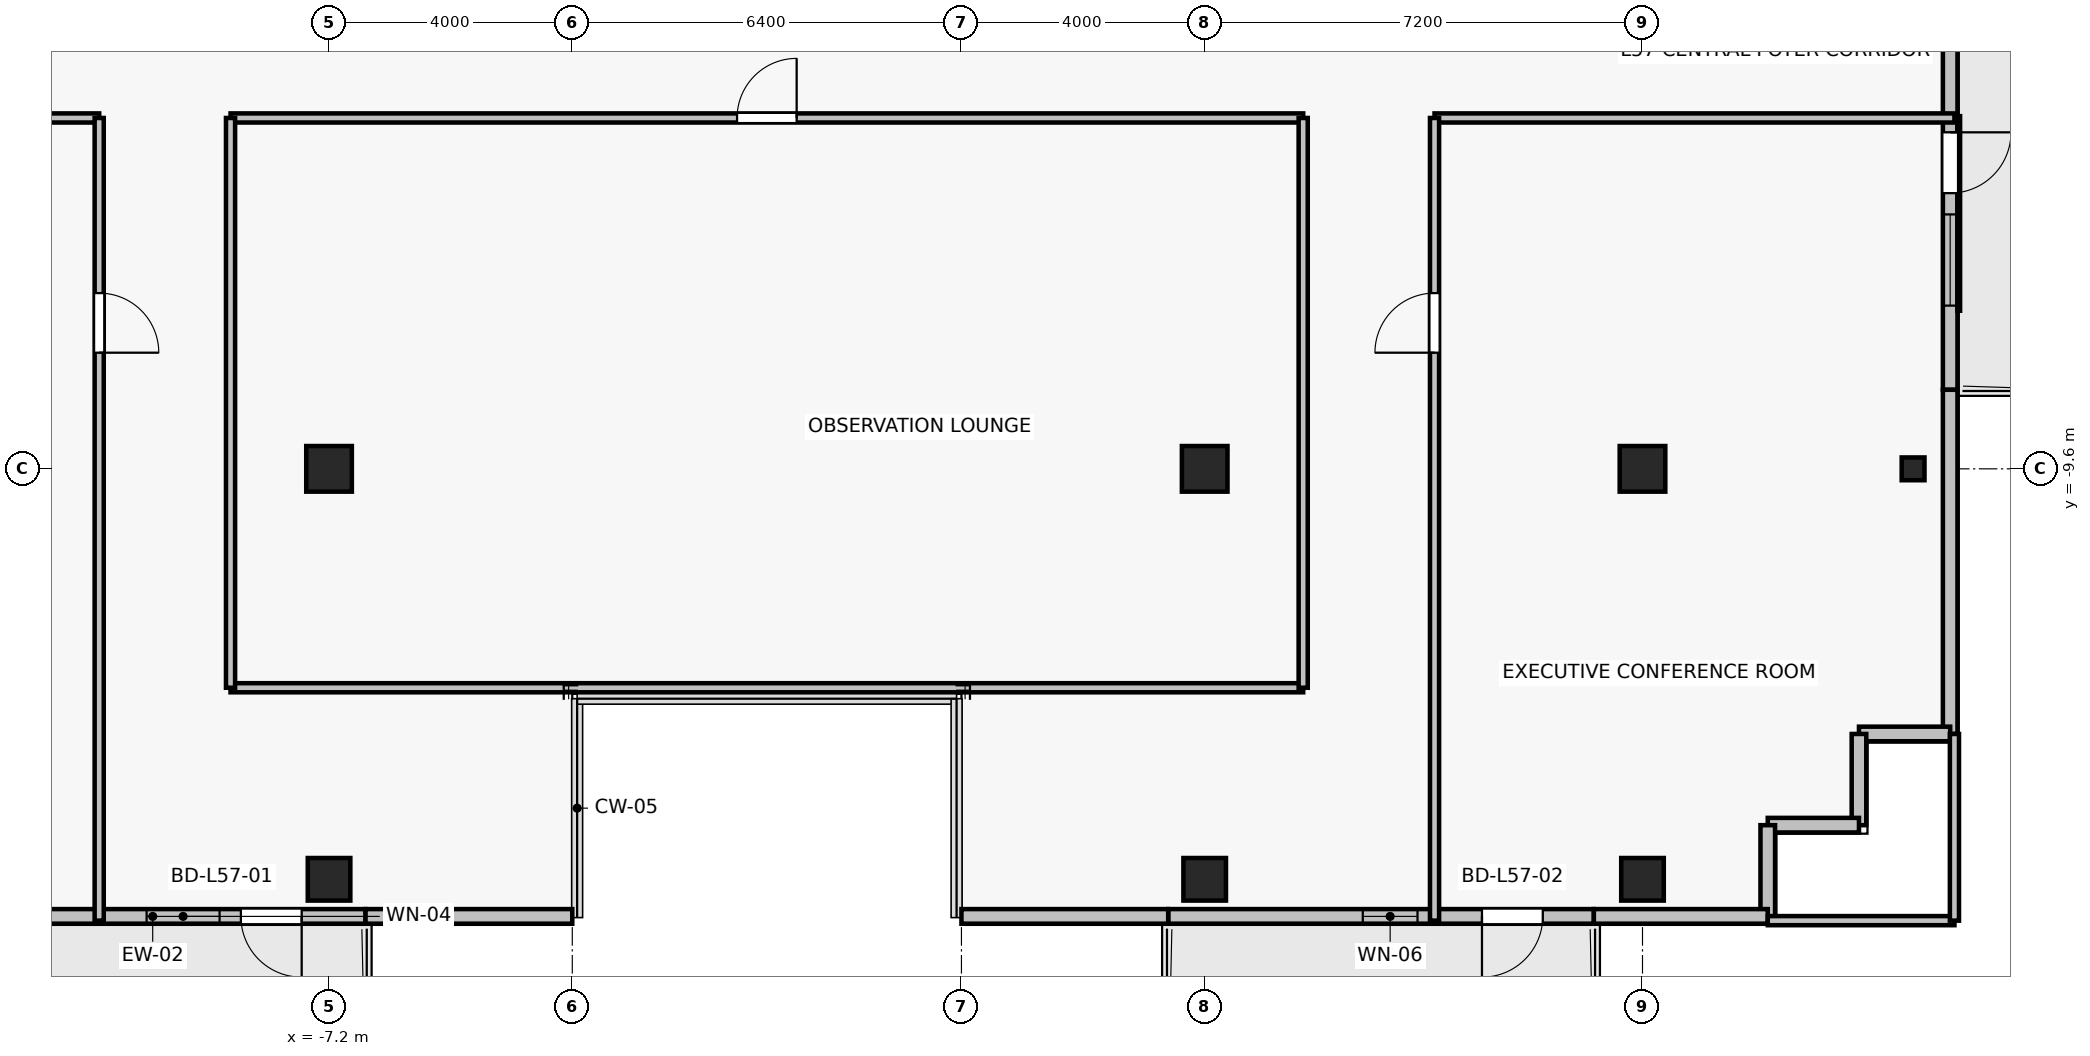
"""IFC4 building model, lengths in metres.
Left out: names, types, materials, properties, quantities, classifications, styles, units other than length and angle.
Written with IfcOpenShell. Run it as: python <this file> out.ifc"""

import sys

from ifc_helpers import new_model, si_unit, direction, frame, frame_2d, origin, origin_2d, place, context, subcontext, project, spatial, rectangle, i_section, extrude, source, transform, mapped, element, fill, save


model = new_model("IFC4")
c1 = context("Model", 3, precision=1e-05, world=origin(), true_north=direction((0.0, 1.0)))
c2 = subcontext(c1, "Body", "Model", "MODEL_VIEW")
j1 = project(units=[si_unit("LENGTHUNIT", "METRE"), si_unit("PLANEANGLEUNIT", "RADIAN")], contexts=[c1])
p1 = place(None, origin())
s1 = spatial("IfcSite", under=j1, at=p1, CompositionType="ELEMENT")
p2 = place(p1, origin())
s2 = spatial("IfcBuilding", under=s1, at=p2, CompositionType="ELEMENT")
p3 = place(p2, frame((0.0, 0.0, 205.6)))
s3 = spatial("IfcBuildingStorey", under=s2, at=p3, CompositionType="ELEMENT", Elevation=205.6)
for number, where, z_axis, x_axis in (
    (1, (-7.2, -9.6, 0.0), (0.0, 0.0, 1.0), (1.0, 0.0, 0.0)),
    (2, (7.2, -9.6, 0.0), (0.0, 0.0, 1.0), (1.0, 0.0, 0.0)),
    (3, (14.4, -9.6, 0.0), (0.0, 0.0, 1.0), (1.0, 0.0, 0.0)),
):
    element("IfcColumn", number, at=place(p3, frame(where, z_axis=z_axis, x_axis=x_axis)), inside=s3, PredefinedType="COLUMN", context=c2, shape_type="SweptSolid", body=[
        extrude(rectangle(XDim=0.75, YDim=0.75, at=origin_2d()), origin(), (0.0, 0.0, 1.0), 3.3),
    ])
for number, where, z_axis, x_axis in (
    (4, (-7.2, -16.35, 0.0), (0.0, 0.0, 1.0), (1.0, 0.0, 0.0)),
    (5, (7.2, -16.35, 0.0), (0.0, 0.0, 1.0), (1.0, 0.0, 0.0)),
    (6, (14.4, -16.35, 0.0), (0.0, 0.0, 1.0), (1.0, 0.0, 0.0)),
):
    element("IfcColumn", number, at=place(p3, frame(where, z_axis=z_axis, x_axis=x_axis)), inside=s3, PredefinedType="COLUMN", context=c2, shape_type="SweptSolid", body=[
        extrude(rectangle(XDim=0.7, YDim=0.7, at=origin_2d()), origin(), (0.0, 0.0, 1.0), 3.3),
    ])
p4 = place(p3, frame((18.85, -9.6, 0.0), z_axis=(0.0, 0.0, 1.0), x_axis=(1.0, 0.0, 0.0)))
e7 = element("IfcColumn", 7, at=p4, inside=s3, PredefinedType="COLUMN", context=c2, shape_type="SweptSolid", body=[
    extrude(i_section(OverallWidth=0.375, OverallDepth=0.375, WebThickness=0.017, FlangeThickness=0.027, FilletRadius=0.015, at=origin_2d()), origin(), (0.0, 0.0, 1.0), 3.3),
])
p5 = place(p3, frame((-6.6, -16.96, 0.0), z_axis=(0.0, 0.0, 1.0), x_axis=(-1.0, 0.0, 0.0)))
e8 = element("IfcWall", 8, at=p5, inside=s3, PredefinedType="SOLIDWALL", context=c2, shape_type="SweptSolid", body=[
    extrude(rectangle(XDim=7.0, YDim=0.24, at=frame_2d((3.5, 0.0))), origin(), (0.0, 0.0, 1.0), 2.665),
])
p6 = place(p5, frame((1.05, 0.0, 0.0)))
e9 = element("IfcOpeningElement", 9, at=p6, cuts=e8, PredefinedType="OPENING", context=c2, shape_type="SweptSolid", body=[
    extrude(rectangle(XDim=1.0, YDim=2.2, at=frame_2d((0.5, 1.1))), frame((0.0, 0.13, 0.0), z_axis=(0.0, -1.0, 0.0), x_axis=(1.0, 0.0, 0.0)), (0.0, 0.0, 1.0), 0.26),
])
p7 = place(p5, frame((2.4, 0.0, 0.85)))
e10 = element("IfcOpeningElement", 10, at=p7, cuts=e8, PredefinedType="OPENING", context=c2, shape_type="SweptSolid", body=[
    extrude(rectangle(XDim=1.2, YDim=1.5, at=frame_2d((0.6, 0.75))), frame((0.0, 0.13, 0.0), z_axis=(0.0, -1.0, 0.0), x_axis=(1.0, 0.0, 0.0)), (0.0, 0.0, 1.0), 0.26),
])
p8 = place(p3, frame((13.6, -16.96, 0.0), z_axis=(0.0, 0.0, 1.0), x_axis=(-1.0, 0.0, 0.0)))
e11 = element("IfcWall", 11, at=p8, inside=s3, PredefinedType="SOLIDWALL", context=c2, shape_type="SweptSolid", body=[
    extrude(rectangle(XDim=7.0, YDim=0.24, at=frame_2d((3.5, 0.0))), origin(), (0.0, 0.0, 1.0), 2.665),
])
p9 = place(p8, frame((0.84, 0.0, 0.0)))
e12 = element("IfcOpeningElement", 12, at=p9, cuts=e11, PredefinedType="OPENING", context=c2, shape_type="SweptSolid", body=[
    extrude(rectangle(XDim=1.0, YDim=2.2, at=frame_2d((0.5, 1.1))), frame((0.0, 0.13, 0.0), z_axis=(0.0, -1.0, 0.0), x_axis=(1.0, 0.0, 0.0)), (0.0, 0.0, 1.0), 0.26),
])
p10 = place(p8, frame((2.9, 0.0, 0.85)))
e13 = element("IfcOpeningElement", 13, at=p10, cuts=e11, PredefinedType="OPENING", context=c2, shape_type="SweptSolid", body=[
    extrude(rectangle(XDim=0.9, YDim=1.35, at=frame_2d((0.45, 0.675))), frame((0.0, 0.13, 0.0), z_axis=(0.0, -1.0, 0.0), x_axis=(1.0, 0.0, 0.0)), (0.0, 0.0, 1.0), 0.26),
])
p11 = place(p3, frame((19.46, -2.5, 0.0), z_axis=(0.0, 0.0, 1.0), x_axis=(0.0, -1.0, 0.0)))
e14 = element("IfcWall", 14, at=p11, inside=s3, PredefinedType="SOLIDWALL", context=c2, shape_type="SweptSolid", body=[
    extrude(rectangle(XDim=5.8, YDim=0.24, at=frame_2d((2.9, 0.0))), origin(), (0.0, 0.0, 1.0), 3.075),
])
p12 = place(p11, frame((1.566, 0.0, 0.0)))
e15 = element("IfcOpeningElement", 15, at=p12, cuts=e14, PredefinedType="OPENING", context=c2, shape_type="SweptSolid", body=[
    extrude(rectangle(XDim=1.0, YDim=2.2, at=frame_2d((0.5, 1.1))), frame((0.0, 0.13, 0.0), z_axis=(0.0, -1.0, 0.0), x_axis=(1.0, 0.0, 0.0)), (0.0, 0.0, 1.0), 0.26),
])
p13 = place(p11, frame((2.916, 0.0, 0.85)))
e16 = element("IfcOpeningElement", 16, at=p13, cuts=e14, PredefinedType="OPENING", context=c2, shape_type="SweptSolid", body=[
    extrude(rectangle(XDim=1.5, YDim=1.6, at=frame_2d((0.75, 0.8))), frame((0.0, 0.13, 0.0), z_axis=(0.0, -1.0, 0.0), x_axis=(1.0, 0.0, 0.0)), (0.0, 0.0, 1.0), 0.26),
])
p14 = place(p3, frame((19.46, -13.96, 0.0), z_axis=(0.0, 0.0, 1.0), x_axis=(0.0, 1.0, 0.0)))
e17 = element("IfcWall", 17, at=p14, inside=s3, PredefinedType="SOLIDWALL", context=c2, shape_type="SweptSolid", body=[
    extrude(rectangle(XDim=5.66, YDim=0.24, at=frame_2d((2.83, 0.0))), origin(), (0.0, 0.0, 1.0), 3.075),
])
for number, where, z_axis, x_axis in (
    (18, (17.96, -13.96, 0.0), (0.0, 0.0, 1.0), (1.0, 0.0, 0.0)),
    (19, (17.96, -15.46, 0.0), (0.0, 0.0, 1.0), (0.0, 1.0, 0.0)),
    (20, (16.46, -15.46, 0.0), (0.0, 0.0, 1.0), (1.0, 0.0, 0.0)),
    (21, (16.46, -16.96, 0.0), (0.0, 0.0, 1.0), (0.0, 1.0, 0.0)),
):
    element("IfcWall", number, at=place(p3, frame(where, z_axis=z_axis, x_axis=x_axis)), inside=s3, PredefinedType="SOLIDWALL", context=c2, shape_type="SweptSolid", body=[
        extrude(rectangle(XDim=1.5, YDim=0.24, at=frame_2d((0.75, 0.0))), origin(), (0.0, 0.0, 1.0), 3.075),
    ])
p15 = place(p3, frame((13.6, -16.96, 0.0), z_axis=(0.0, 0.0, 1.0), x_axis=(1.0, 0.0, 0.0)))
e22 = element("IfcWall", 22, at=p15, inside=s3, PredefinedType="SOLIDWALL", context=c2, shape_type="SweptSolid", body=[
    extrude(rectangle(XDim=2.86, YDim=0.24, at=frame_2d((1.43, 0.0))), origin(), (0.0, 0.0, 1.0), 2.665),
])
for number, where, z_axis, x_axis in (
    (23, (3.2, -16.96, 0.0), (0.0, 0.0, 1.0), (1.0, 0.0, 0.0)),
    (24, (-6.6, -16.96, 0.0), (0.0, 0.0, 1.0), (1.0, 0.0, 0.0)),
):
    element("IfcWall", number, at=place(p3, frame(where, z_axis=z_axis, x_axis=x_axis)), inside=s3, PredefinedType="SOLIDWALL", context=c2, shape_type="SweptSolid", body=[
        extrude(rectangle(XDim=3.4, YDim=0.24, at=frame_2d((1.7, 0.0))), origin(), (0.0, 0.0, 1.0), 3.075),
    ])
p16 = place(p3, frame((-23.53, -3.83, 0.0), z_axis=(0.0, 0.0, 1.0), x_axis=(1.0, 0.0, 0.0)))
e25 = element("IfcWall", 25, at=p16, inside=s3, PredefinedType="PARTITIONING", context=c2, shape_type="SweptSolid", body=[
    extrude(rectangle(XDim=12.55, YDim=0.15, at=frame_2d((6.275, 0.0))), origin(), (0.0, 0.0, 1.0), 2.615),
])
p17 = place(p3, frame((-10.98, -3.83, 0.0), z_axis=(0.0, 0.0, 1.0), x_axis=(0.0, -1.0, 0.0)))
e26 = element("IfcWall", 26, at=p17, inside=s3, PredefinedType="PARTITIONING", context=c2, shape_type="SweptSolid", body=[
    extrude(rectangle(XDim=13.2, YDim=0.15, at=frame_2d((6.6, 0.0))), origin(), (0.0, 0.0, 1.0), 2.615),
])
p18 = place(p17, frame((2.88, 0.0, 0.0)))
e27 = element("IfcOpeningElement", 27, at=p18, cuts=e26, PredefinedType="OPENING", context=c2, shape_type="SweptSolid", body=[
    extrude(rectangle(XDim=0.98, YDim=2.15, at=frame_2d((0.49, 1.075))), frame((0.0, 0.085, 0.0), z_axis=(0.0, -1.0, 0.0), x_axis=(1.0, 0.0, 0.0)), (0.0, 0.0, 1.0), 0.17),
])
p19 = place(p3, frame((19.53, -17.03, 0.0), z_axis=(0.0, 0.0, 1.0), x_axis=(-1.0, 0.0, 0.0)))
e28 = element("IfcWall", 28, at=p19, inside=s3, PredefinedType="PARTITIONING", context=c2, shape_type="SweptSolid", body=[
    extrude(rectangle(XDim=3.07, YDim=0.15, at=frame_2d((1.535, 0.0))), origin(), (0.0, 0.0, 1.0), 2.665),
])
p20 = place(p3, frame((10.98, -3.83, 0.0), z_axis=(0.0, 0.0, 1.0), x_axis=(1.0, 0.0, 0.0)))
e29 = element("IfcWall", 29, at=p20, inside=s3, PredefinedType="PARTITIONING", context=c2, shape_type="SweptSolid", body=[
    extrude(rectangle(XDim=8.55, YDim=0.15, at=frame_2d((4.275, 0.0))), origin(), (0.0, 0.0, 1.0), 2.615),
])
p21 = place(p3, frame((10.98, -17.03, 0.0), z_axis=(0.0, 0.0, 1.0), x_axis=(0.0, 1.0, 0.0)))
e30 = element("IfcWall", 30, at=p21, inside=s3, PredefinedType="PARTITIONING", context=c2, shape_type="SweptSolid", body=[
    extrude(rectangle(XDim=13.2, YDim=0.15, at=frame_2d((6.6, 0.0))), origin(), (0.0, 0.0, 1.0), 2.615),
])
p22 = place(p21, frame((9.34, 0.0, 0.0)))
e31 = element("IfcOpeningElement", 31, at=p22, cuts=e30, PredefinedType="OPENING", context=c2, shape_type="SweptSolid", body=[
    extrude(rectangle(XDim=0.98, YDim=2.15, at=frame_2d((0.49, 1.075))), frame((0.0, 0.085, 0.0), z_axis=(0.0, -1.0, 0.0), x_axis=(1.0, 0.0, 0.0)), (0.0, 0.0, 1.0), 0.17),
])
p23 = place(p3, frame((19.53, -13.96, 0.0), z_axis=(0.0, 0.0, 1.0), x_axis=(0.0, -1.0, 0.0)))
e32 = element("IfcWall", 32, at=p23, inside=s3, PredefinedType="PARTITIONING", context=c2, shape_type="SweptSolid", body=[
    extrude(rectangle(XDim=3.07, YDim=0.15, at=frame_2d((1.535, 0.0))), origin(), (0.0, 0.0, 1.0), 3.075),
])
p24 = place(p3, frame((8.82, -13.2, 0.0), z_axis=(0.0, 0.0, 1.0), x_axis=(-1.0, 0.0, 0.0)))
e33 = element("IfcWall", 33, at=p24, inside=s3, PredefinedType="PARTITIONING", context=c2, shape_type="SweptSolid", body=[
    extrude(rectangle(XDim=17.64, YDim=0.15, at=frame_2d((8.82, 0.0))), origin(), (0.0, 0.0, 1.0), 2.615),
])
p25 = place(p3, frame((-8.82, -3.83, 0.0), z_axis=(0.0, 0.0, 1.0), x_axis=(1.0, 0.0, 0.0)))
e34 = element("IfcWall", 34, at=p25, inside=s3, PredefinedType="PARTITIONING", context=c2, shape_type="SweptSolid", body=[
    extrude(rectangle(XDim=17.64, YDim=0.15, at=frame_2d((8.82, 0.0))), origin(), (0.0, 0.0, 1.0), 2.615),
])
p26 = place(p25, frame((8.33, 0.0, 0.0)))
e35 = element("IfcOpeningElement", 35, at=p26, cuts=e34, PredefinedType="OPENING", context=c2, shape_type="SweptSolid", body=[
    extrude(rectangle(XDim=0.98, YDim=2.15, at=frame_2d((0.49, 1.075))), frame((0.0, 0.085, 0.0), z_axis=(0.0, -1.0, 0.0), x_axis=(1.0, 0.0, 0.0)), (0.0, 0.0, 1.0), 0.17),
])
for number, where, z_axis, x_axis in (
    (36, (-8.82, -13.2, 0.0), (0.0, 0.0, 1.0), (0.0, 1.0, 0.0)),
    (37, (8.82, -3.83, 0.0), (0.0, 0.0, 1.0), (0.0, -1.0, 0.0)),
):
    element("IfcWall", number, at=place(p3, frame(where, z_axis=z_axis, x_axis=x_axis)), inside=s3, PredefinedType="PARTITIONING", context=c2, shape_type="SweptSolid", body=[
        extrude(rectangle(XDim=9.37, YDim=0.15, at=frame_2d((4.685, 0.0))), origin(), (0.0, 0.0, 1.0), 2.615),
    ])
m1 = source(origin(), c2, "Body", "SweptSolid", [
    extrude(rectangle(XDim=1.0, YDim=2.2, at=frame_2d((0.5, 1.1))), frame((0.0, 0.025, 0.0), z_axis=(0.0, -1.0, 0.0), x_axis=(1.0, 0.0, 0.0)), (0.0, 0.0, 1.0), 0.05),
])
p27 = place(p6, origin())
e38 = element("IfcDoor", 38, at=p27, inside=s3, OperationType="SINGLE_SWING_LEFT", PredefinedType="DOOR", context=c2, shape_type="MappedRepresentation", body=[
    mapped(m1, transform((0.0, 0.0, 0.0), x_axis=(1.0, 0.0, 0.0), y_axis=(0.0, 1.0, 0.0), z_axis=(0.0, 0.0, 1.0), scale=1.0)),
])
fill(e9, e38)
m2 = source(origin(), c2, "Body", "SweptSolid", [
    extrude(rectangle(XDim=1.2, YDim=1.5, at=frame_2d((0.6, 0.75))), frame((0.0, 0.03, 0.0), z_axis=(0.0, -1.0, 0.0), x_axis=(1.0, 0.0, 0.0)), (0.0, 0.0, 1.0), 0.06),
])
p28 = place(p7, origin())
e39 = element("IfcWindow", 39, at=p28, inside=s3, PartitioningType="SINGLE_PANEL", PredefinedType="WINDOW", context=c2, shape_type="MappedRepresentation", body=[
    mapped(m2, transform((0.0, 0.0, 0.0), x_axis=(1.0, 0.0, 0.0), y_axis=(0.0, 1.0, 0.0), z_axis=(0.0, 0.0, 1.0), scale=1.0)),
])
fill(e10, e39)
p29 = place(p9, origin())
e40 = element("IfcDoor", 40, at=p29, inside=s3, OperationType="SINGLE_SWING_RIGHT", PredefinedType="DOOR", context=c2, shape_type="MappedRepresentation", body=[
    mapped(m1, transform((0.0, 0.0, 0.0), x_axis=(1.0, 0.0, 0.0), y_axis=(0.0, 1.0, 0.0), z_axis=(0.0, 0.0, 1.0), scale=1.0)),
])
fill(e12, e40)
m3 = source(origin(), c2, "Body", "SweptSolid", [
    extrude(rectangle(XDim=0.9, YDim=1.35, at=frame_2d((0.45, 0.675))), frame((0.0, 0.03, 0.0), z_axis=(0.0, -1.0, 0.0), x_axis=(1.0, 0.0, 0.0)), (0.0, 0.0, 1.0), 0.06),
])
p30 = place(p10, origin())
e41 = element("IfcWindow", 41, at=p30, inside=s3, PartitioningType="SINGLE_PANEL", PredefinedType="WINDOW", context=c2, shape_type="MappedRepresentation", body=[
    mapped(m3, transform((0.0, 0.0, 0.0), x_axis=(1.0, 0.0, 0.0), y_axis=(0.0, 1.0, 0.0), z_axis=(0.0, 0.0, 1.0), scale=1.0)),
])
fill(e13, e41)
p31 = place(p12, origin())
e42 = element("IfcDoor", 42, at=p31, inside=s3, OperationType="SINGLE_SWING_LEFT", PredefinedType="DOOR", context=c2, shape_type="MappedRepresentation", body=[
    mapped(m1, transform((0.0, 0.0, 0.0), x_axis=(1.0, 0.0, 0.0), y_axis=(0.0, 1.0, 0.0), z_axis=(0.0, 0.0, 1.0), scale=1.0)),
])
fill(e15, e42)
m4 = source(origin(), c2, "Body", "SweptSolid", [
    extrude(rectangle(XDim=1.5, YDim=1.6, at=frame_2d((0.75, 0.8))), frame((0.0, 0.03, 0.0), z_axis=(0.0, -1.0, 0.0), x_axis=(1.0, 0.0, 0.0)), (0.0, 0.0, 1.0), 0.06),
])
p32 = place(p13, origin())
e43 = element("IfcWindow", 43, at=p32, inside=s3, PartitioningType="SINGLE_PANEL", PredefinedType="WINDOW", context=c2, shape_type="MappedRepresentation", body=[
    mapped(m4, transform((0.0, 0.0, 0.0), x_axis=(1.0, 0.0, 0.0), y_axis=(0.0, 1.0, 0.0), z_axis=(0.0, 0.0, 1.0), scale=1.0)),
])
fill(e16, e43)
m5 = source(origin(), c2, "Body", "SweptSolid", [
    extrude(rectangle(XDim=0.98, YDim=2.15, at=frame_2d((0.49, 1.075))), frame((0.0, 0.025, 0.0), z_axis=(0.0, -1.0, 0.0), x_axis=(1.0, 0.0, 0.0)), (0.0, 0.0, 1.0), 0.05),
])
p33 = place(p18, origin())
e44 = element("IfcDoor", 44, at=p33, inside=s3, OperationType="SINGLE_SWING_RIGHT", PredefinedType="DOOR", context=c2, shape_type="MappedRepresentation", body=[
    mapped(m5, transform((0.0, 0.0, 0.0), x_axis=(1.0, 0.0, 0.0), y_axis=(0.0, 1.0, 0.0), z_axis=(0.0, 0.0, 1.0), scale=1.0)),
])
fill(e27, e44)
p34 = place(p22, origin())
e45 = element("IfcDoor", 45, at=p34, inside=s3, OperationType="SINGLE_SWING_LEFT", PredefinedType="DOOR", context=c2, shape_type="MappedRepresentation", body=[
    mapped(m5, transform((0.0, 0.0, 0.0), x_axis=(1.0, 0.0, 0.0), y_axis=(0.0, 1.0, 0.0), z_axis=(0.0, 0.0, 1.0), scale=1.0)),
])
fill(e31, e45)
p35 = place(p26, origin())
e46 = element("IfcDoor", 46, at=p35, inside=s3, OperationType="SINGLE_SWING_RIGHT", PredefinedType="DOOR", context=c2, shape_type="MappedRepresentation", body=[
    mapped(m5, transform((0.0, 0.0, 0.0), x_axis=(1.0, 0.0, 0.0), y_axis=(0.0, 1.0, 0.0), z_axis=(0.0, 0.0, 1.0), scale=1.0)),
])
fill(e35, e46)
save(model, sys.argv[1])
